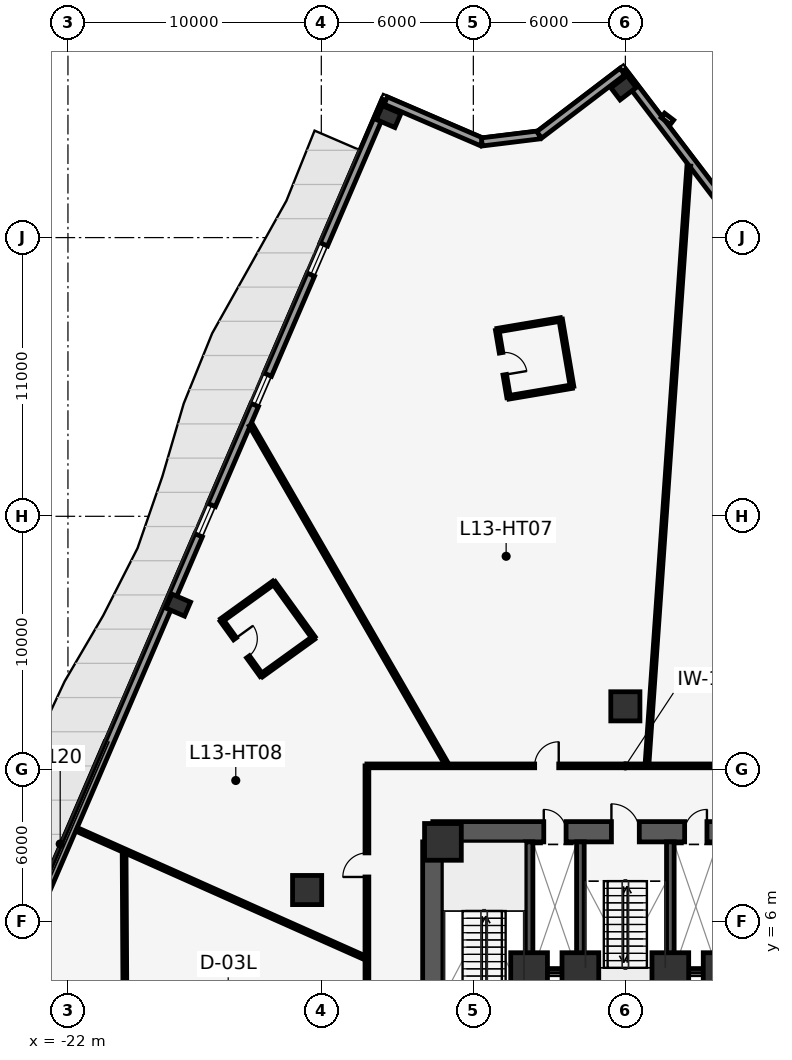
"""IFC4 building model, lengths in metres.
Left out: names, types, materials, properties, quantities, classifications, styles, units other than length and angle.
Written with IfcOpenShell. Run it as: python <this file> out.ifc"""

import sys

from ifc_helpers import new_model, si_unit, direction, frame, frame_2d, origin, origin_2d, place, context, subcontext, project, spatial, rectangle, hollow_rectangle, extrude, element, fill, save


model = new_model("IFC4")
c1 = context("Model", 3, precision=1e-05, world=origin(), true_north=direction((0.0, 1.0)))
c2 = subcontext(c1, "Body", "Model", "MODEL_VIEW")
j1 = project(units=[si_unit("LENGTHUNIT", "METRE"), si_unit("PLANEANGLEUNIT", "RADIAN")], contexts=[c1])
p1 = place(None, origin())
s1 = spatial("IfcSite", under=j1, at=p1, CompositionType="ELEMENT")
p2 = place(p1, origin())
s2 = spatial("IfcBuilding", under=s1, at=p2, CompositionType="ELEMENT")
p3 = place(p2, frame((0.0, 0.0, 62.4)))
s3 = spatial("IfcBuildingStorey", under=s2, at=p3, CompositionType="ELEMENT", Elevation=62.4)
p4 = place(p3, frame((-7.6, 9.55, 0.0), z_axis=(0.0, 0.0, 1.0), x_axis=(1.0, 0.0, 0.0)))
e1 = element("IfcWall", 1, at=p4, inside=s3, PredefinedType="SHEAR", context=c2, shape_type="SweptSolid", body=[
    extrude(rectangle(XDim=15.2, YDim=0.8, at=frame_2d((7.6, 0.0))), origin(), (0.0, 0.0, 1.0), 4.35),
])
p5 = place(p4, frame((7.05, 0.0, 0.0)))
e2 = element("IfcOpeningElement", 2, at=p5, cuts=e1, PredefinedType="OPENING", context=c2, shape_type="SweptSolid", body=[
    extrude(rectangle(XDim=1.1, YDim=2.15, at=frame_2d((0.55, 1.075))), frame((0.0, 0.41, 0.0), z_axis=(0.0, -1.0, 0.0), x_axis=(1.0, 0.0, 0.0)), (0.0, 0.0, 1.0), 0.82),
])
p6 = place(p4, frame((4.38, 0.0, 0.0)))
e3 = element("IfcOpeningElement", 3, at=p6, cuts=e1, PredefinedType="OPENING", context=c2, shape_type="SweptSolid", body=[
    extrude(rectangle(XDim=0.88, YDim=2.15, at=frame_2d((0.44, 1.075))), frame((0.0, 0.41, 0.0), z_axis=(0.0, -1.0, 0.0), x_axis=(1.0, 0.0, 0.0)), (0.0, 0.0, 1.0), 0.82),
])
p7 = place(p4, frame((9.94, 0.0, 0.0)))
e4 = element("IfcOpeningElement", 4, at=p7, cuts=e1, PredefinedType="OPENING", context=c2, shape_type="SweptSolid", body=[
    extrude(rectangle(XDim=0.88, YDim=2.15, at=frame_2d((0.44, 1.075))), frame((0.0, 0.41, 0.0), z_axis=(0.0, -1.0, 0.0), x_axis=(1.0, 0.0, 0.0)), (0.0, 0.0, 1.0), 0.82),
])
for number, where, z_axis, x_axis in (
    (5, (-3.8, 1.45, 0.0), (0.0, 0.0, 1.0), (0.0, 1.0, 0.0)),
    (6, (-1.775, 1.45, 0.0), (0.0, 0.0, 1.0), (0.0, 1.0, 0.0)),
    (7, (1.775, 1.45, 0.0), (0.0, 0.0, 1.0), (0.0, 1.0, 0.0)),
):
    element("IfcWall", number, at=place(p3, frame(where, z_axis=z_axis, x_axis=x_axis)), inside=s3, PredefinedType="SHEAR", context=c2, shape_type="SweptSolid", body=[
        extrude(rectangle(XDim=7.7, YDim=0.3, at=frame_2d((3.85, 0.0))), origin(), (0.0, 0.0, 1.0), 4.35),
    ])
p8 = place(p3, frame((-7.6, 0.1, 0.0), z_axis=(0.0, 0.0, 1.0), x_axis=(0.0, 1.0, 0.0)))
e8 = element("IfcWall", 8, at=p8, inside=s3, PredefinedType="SHEAR", context=c2, shape_type="SweptSolid", body=[
    extrude(rectangle(XDim=9.05, YDim=0.8, at=frame_2d((4.525, 0.0))), origin(), (0.0, 0.0, 1.0), 4.35),
])
for number, where, z_axis, x_axis in (
    (9, (-7.2, 9.15, 0.0), (0.0, 0.0, 1.0), (1.0, 0.0, 0.0)),
    (10, (-3.8, 4.05, 0.0), (0.0, 0.0, 1.0), (1.0, 0.0, 0.0)),
    (11, (3.8, 4.05, 0.0), (0.0, 0.0, 1.0), (1.0, 0.0, 0.0)),
    (12, (-1.775, 4.05, 0.0), (0.0, 0.0, 1.0), (1.0, 0.0, 0.0)),
    (13, (1.775, 4.05, 0.0), (0.0, 0.0, 1.0), (1.0, 0.0, 0.0)),
):
    element("IfcColumn", number, at=place(p3, frame(where, z_axis=z_axis, x_axis=x_axis)), inside=s3, PredefinedType="COLUMN", context=c2, shape_type="SweptSolid", body=[
        extrude(rectangle(XDim=1.45, YDim=1.45, at=origin_2d()), origin(), (0.0, 0.0, 1.0), 4.6),
    ])
for number, where, z_axis, x_axis in (
    (14, (0.0, 14.5, 0.0), (0.0, 0.0, 1.0), (1.0, 0.0, 0.0)),
    (15, (-12.56, 7.25, 0.0), (0.0, 0.0, 1.0), (1.0, 0.0, 0.0)),
):
    element("IfcColumn", number, at=place(p3, frame(where, z_axis=z_axis, x_axis=x_axis)), inside=s3, PredefinedType="COLUMN", context=c2, shape_type="SweptSolid", body=[
        extrude(rectangle(XDim=1.15, YDim=1.15, at=origin_2d()), origin(), (0.0, 0.0, 1.0), 4.6),
    ])
for number, where, z_axis, x_axis in (
    (16, (-9.344, 37.777, 0.0), (0.0, 0.0, 1.0), (0.396, 0.918, 0.0)),
    (17, (-17.648, 18.495, 0.0), (0.0, 0.0, 1.0), (0.396, 0.918, 0.0)),
    (18, (-0.072, 38.915, 0.0), (0.0, 0.0, 1.0), (-0.606, 0.795, 0.0)),
):
    element("IfcColumn", number, at=place(p3, frame(where, z_axis=z_axis, x_axis=x_axis)), inside=s3, PredefinedType="COLUMN", context=c2, shape_type="SweptSolid", body=[
        extrude(hollow_rectangle(XDim=0.6, YDim=0.8, WallThickness=0.05, at=origin_2d()), origin(), (0.0, 0.0, 1.0), 4.6),
    ])
p9 = place(p3, frame((-0.115, 39.555, 0.0), z_axis=(0.0, 0.0, 1.0), x_axis=(0.605877389385, -0.795558036243, 0.0)))
e19 = element("IfcWall", 19, at=p9, inside=s3, PredefinedType="STANDARD", context=c2, shape_type="SweptSolid", body=[
    extrude(rectangle(XDim=64.058, YDim=0.32, at=frame_2d((32.029, 0.0))), origin(), (0.0, 0.0, 1.0), 4.35),
])
p10 = place(p9, frame((6.179, 0.0, 0.85)))
e20 = element("IfcOpeningElement", 20, at=p10, cuts=e19, PredefinedType="OPENING", context=c2, shape_type="SweptSolid", body=[
    extrude(rectangle(XDim=1.3, YDim=2.1, at=frame_2d((0.65, 1.05))), frame((0.0, 0.17, 0.0), z_axis=(0.0, -1.0, 0.0), x_axis=(1.0, 0.0, 0.0)), (0.0, 0.0, 1.0), 0.34),
])
p11 = place(p9, frame((11.779, 0.0, 0.85)))
e21 = element("IfcOpeningElement", 21, at=p11, cuts=e19, PredefinedType="OPENING", context=c2, shape_type="SweptSolid", body=[
    extrude(rectangle(XDim=1.3, YDim=2.1, at=frame_2d((0.65, 1.05))), frame((0.0, 0.17, 0.0), z_axis=(0.0, -1.0, 0.0), x_axis=(1.0, 0.0, 0.0)), (0.0, 0.0, 1.0), 0.34),
])
p12 = place(p9, frame((17.379, 0.0, 0.85)))
e22 = element("IfcOpeningElement", 22, at=p12, cuts=e19, PredefinedType="OPENING", context=c2, shape_type="SweptSolid", body=[
    extrude(rectangle(XDim=1.3, YDim=2.1, at=frame_2d((0.65, 1.05))), frame((0.0, 0.17, 0.0), z_axis=(0.0, -1.0, 0.0), x_axis=(1.0, 0.0, 0.0)), (0.0, 0.0, 1.0), 0.34),
])
p13 = place(p9, frame((50.979, 0.0, 0.85)))
e23 = element("IfcOpeningElement", 23, at=p13, cuts=e19, PredefinedType="OPENING", context=c2, shape_type="SweptSolid", body=[
    extrude(rectangle(XDim=1.3, YDim=2.1, at=frame_2d((0.65, 1.05))), frame((0.0, 0.17, 0.0), z_axis=(0.0, -1.0, 0.0), x_axis=(1.0, 0.0, 0.0)), (0.0, 0.0, 1.0), 0.34),
])
p14 = place(p9, frame((56.579, 0.0, 0.85)))
e24 = element("IfcOpeningElement", 24, at=p14, cuts=e19, PredefinedType="OPENING", context=c2, shape_type="SweptSolid", body=[
    extrude(rectangle(XDim=1.3, YDim=2.1, at=frame_2d((0.65, 1.05))), frame((0.0, 0.17, 0.0), z_axis=(0.0, -1.0, 0.0), x_axis=(1.0, 0.0, 0.0)), (0.0, 0.0, 1.0), 0.34),
])
p15 = place(p3, frame((-34.787, -20.429, 0.0), z_axis=(0.0, 0.0, 1.0), x_axis=(0.395418293843, 0.91850115563, 0.0)))
e25 = element("IfcWall", 25, at=p15, inside=s3, PredefinedType="STANDARD", context=c2, shape_type="SweptSolid", body=[
    extrude(rectangle(XDim=64.058, YDim=0.32, at=frame_2d((32.029, 0.0))), origin(), (0.0, 0.0, 1.0), 4.35),
])
p16 = place(p15, frame((23.542, 0.0, 0.0)))
e26 = element("IfcOpeningElement", 26, at=p16, cuts=e25, PredefinedType="OPENING", context=c2, shape_type="SweptSolid", body=[
    extrude(rectangle(XDim=1.6, YDim=2.2, at=frame_2d((0.8, 1.1))), frame((0.0, 0.17, 0.0), z_axis=(0.0, -1.0, 0.0), x_axis=(1.0, 0.0, 0.0)), (0.0, 0.0, 1.0), 0.34),
])
p17 = place(p15, frame((6.179, 0.0, 0.85)))
e27 = element("IfcOpeningElement", 27, at=p17, cuts=e25, PredefinedType="OPENING", context=c2, shape_type="SweptSolid", body=[
    extrude(rectangle(XDim=1.3, YDim=2.1, at=frame_2d((0.65, 1.05))), frame((0.0, 0.17, 0.0), z_axis=(0.0, -1.0, 0.0), x_axis=(1.0, 0.0, 0.0)), (0.0, 0.0, 1.0), 0.34),
])
p18 = place(p15, frame((17.379, 0.0, 0.85)))
e28 = element("IfcOpeningElement", 28, at=p18, cuts=e25, PredefinedType="OPENING", context=c2, shape_type="SweptSolid", body=[
    extrude(rectangle(XDim=1.3, YDim=2.1, at=frame_2d((0.65, 1.05))), frame((0.0, 0.17, 0.0), z_axis=(0.0, -1.0, 0.0), x_axis=(1.0, 0.0, 0.0)), (0.0, 0.0, 1.0), 0.34),
])
p19 = place(p15, frame((45.379, 0.0, 0.85)))
e29 = element("IfcOpeningElement", 29, at=p19, cuts=e25, PredefinedType="OPENING", context=c2, shape_type="SweptSolid", body=[
    extrude(rectangle(XDim=1.3, YDim=2.1, at=frame_2d((0.65, 1.05))), frame((0.0, 0.17, 0.0), z_axis=(0.0, -1.0, 0.0), x_axis=(1.0, 0.0, 0.0)), (0.0, 0.0, 1.0), 0.34),
])
p20 = place(p15, frame((50.979, 0.0, 0.85)))
e30 = element("IfcOpeningElement", 30, at=p20, cuts=e25, PredefinedType="OPENING", context=c2, shape_type="SweptSolid", body=[
    extrude(rectangle(XDim=1.3, YDim=2.1, at=frame_2d((0.65, 1.05))), frame((0.0, 0.17, 0.0), z_axis=(0.0, -1.0, 0.0), x_axis=(1.0, 0.0, 0.0)), (0.0, 0.0, 1.0), 0.34),
])
p21 = place(p15, frame((56.579, 0.0, 0.85)))
e31 = element("IfcOpeningElement", 31, at=p21, cuts=e25, PredefinedType="OPENING", context=c2, shape_type="SweptSolid", body=[
    extrude(rectangle(XDim=1.3, YDim=2.1, at=frame_2d((0.65, 1.05))), frame((0.0, 0.17, 0.0), z_axis=(0.0, -1.0, 0.0), x_axis=(1.0, 0.0, 0.0)), (0.0, 0.0, 1.0), 0.34),
])
p22 = place(p3, frame((-9.458, 38.408, 0.0), z_axis=(0.0, 0.0, 1.0), x_axis=(0.918510754284, -0.395395996774, 0.0)))
e32 = element("IfcWall", 32, at=p22, inside=s3, PredefinedType="STANDARD", context=c2, shape_type="SweptSolid", body=[
    extrude(rectangle(XDim=4.129, YDim=0.32, at=frame_2d((2.064, 0.0))), origin(), (0.0, 0.0, 1.0), 4.35),
])
p23 = place(p3, frame((-5.665, 36.776, 0.0), z_axis=(0.0, 0.0, 1.0), x_axis=(0.992547088217, 0.121861715369, 0.0)))
e33 = element("IfcWall", 33, at=p23, inside=s3, PredefinedType="STANDARD", context=c2, shape_type="SweptSolid", body=[
    extrude(rectangle(XDim=2.282, YDim=0.32, at=frame_2d((1.141, 0.0))), origin(), (0.0, 0.0, 1.0), 4.35),
])
p24 = place(p3, frame((-3.4, 37.054, 0.0), z_axis=(0.0, 0.0, 1.0), x_axis=(0.795557931523, 0.605877526891, 0.0)))
e34 = element("IfcWall", 34, at=p24, inside=s3, PredefinedType="STANDARD", context=c2, shape_type="SweptSolid", body=[
    extrude(rectangle(XDim=4.129, YDim=0.32, at=frame_2d((2.064, 0.0))), origin(), (0.0, 0.0, 1.0), 4.35),
])
for number, where, z_axis, x_axis in (
    (35, (-3.65, 4.05, 0.0), (0.0, 0.0, 1.0), (1.0, 0.0, 0.0)),
    (36, (1.92, 4.05, 0.0), (0.0, 0.0, 1.0), (1.0, 0.0, 0.0)),
):
    element("IfcWall", number, at=place(p3, frame(where, z_axis=z_axis, x_axis=x_axis)), inside=s3, PredefinedType="PARTITIONING", context=c2, shape_type="SweptSolid", body=[
        extrude(rectangle(XDim=1.73, YDim=0.2, at=frame_2d((0.865, 0.0))), origin(), (0.0, 0.0, 1.0), 4.35),
    ])
p25 = place(p3, frame((-10.2, 12.15, 0.0), z_axis=(0.0, 0.0, 1.0), x_axis=(1.0, 0.0, 0.0)))
e37 = element("IfcWall", 37, at=p25, inside=s3, PredefinedType="PARTITIONING", context=c2, shape_type="SweptSolid", body=[
    extrude(rectangle(XDim=20.4, YDim=0.15, at=frame_2d((10.2, 0.0))), origin(), (0.0, 0.0, 1.0), 4.35),
])
p26 = place(p25, frame((15.125, 0.0, 0.0)))
e38 = element("IfcOpeningElement", 38, at=p26, cuts=e37, PredefinedType="OPENING", context=c2, shape_type="SweptSolid", body=[
    extrude(rectangle(XDim=0.95, YDim=2.15, at=frame_2d((0.475, 1.075))), frame((0.0, 0.085, 0.0), z_axis=(0.0, -1.0, 0.0), x_axis=(1.0, 0.0, 0.0)), (0.0, 0.0, 1.0), 0.17),
])
p27 = place(p25, frame((6.62, 0.0, 0.0)))
e39 = element("IfcOpeningElement", 39, at=p27, cuts=e37, PredefinedType="OPENING", context=c2, shape_type="SweptSolid", body=[
    extrude(rectangle(XDim=0.95, YDim=2.15, at=frame_2d((0.475, 1.075))), frame((0.0, 0.085, 0.0), z_axis=(0.0, -1.0, 0.0), x_axis=(1.0, 0.0, 0.0)), (0.0, 0.0, 1.0), 0.17),
])
p28 = place(p3, frame((-10.2, -11.85, 0.0), z_axis=(0.0, 0.0, 1.0), x_axis=(0.0, 1.0, 0.0)))
e40 = element("IfcWall", 40, at=p28, inside=s3, PredefinedType="PARTITIONING", context=c2, shape_type="SweptSolid", body=[
    extrude(rectangle(XDim=24.0, YDim=0.15, at=frame_2d((12.0, 0.0))), origin(), (0.0, 0.0, 1.0), 4.35),
])
p29 = place(p28, frame((11.995, 0.0, 0.0)))
e41 = element("IfcOpeningElement", 41, at=p29, cuts=e40, PredefinedType="OPENING", context=c2, shape_type="SweptSolid", body=[
    extrude(rectangle(XDim=0.95, YDim=2.15, at=frame_2d((0.475, 1.075))), frame((0.0, 0.085, 0.0), z_axis=(0.0, -1.0, 0.0), x_axis=(1.0, 0.0, 0.0)), (0.0, 0.0, 1.0), 0.17),
])
p30 = place(p28, frame((3.905, 0.0, 0.0)))
e42 = element("IfcOpeningElement", 42, at=p30, cuts=e40, PredefinedType="OPENING", context=c2, shape_type="SweptSolid", body=[
    extrude(rectangle(XDim=0.95, YDim=2.15, at=frame_2d((0.475, 1.075))), frame((0.0, 0.085, 0.0), z_axis=(0.0, -1.0, 0.0), x_axis=(1.0, 0.0, 0.0)), (0.0, 0.0, 1.0), 0.17),
])
p31 = place(p28, frame((19.615, 0.0, 0.0)))
e43 = element("IfcOpeningElement", 43, at=p31, cuts=e40, PredefinedType="OPENING", context=c2, shape_type="SweptSolid", body=[
    extrude(rectangle(XDim=0.95, YDim=2.15, at=frame_2d((0.475, 1.075))), frame((0.0, 0.085, 0.0), z_axis=(0.0, -1.0, 0.0), x_axis=(1.0, 0.0, 0.0)), (0.0, 0.0, 1.0), 0.17),
])
p32 = place(p3, frame((0.857, 12.255, 0.0), z_axis=(0.0, 0.0, 1.0), x_axis=(0.069754890423, 0.997564160975, 0.0)))
e44 = element("IfcWall", 44, at=p32, inside=s3, PredefinedType="PARTITIONING", context=c2, shape_type="SweptSolid", body=[
    extrude(rectangle(XDim=23.628, YDim=0.15, at=frame_2d((11.814, 0.0))), origin(), (0.0, 0.0, 1.0), 4.35),
])
p33 = place(p3, frame((-7.075, 12.255, 0.0), z_axis=(0.0, 0.0, 1.0), x_axis=(-0.499989871069, 0.866031251647, 0.0)))
e45 = element("IfcWall", 45, at=p33, inside=s3, PredefinedType="PARTITIONING", context=c2, shape_type="SweptSolid", body=[
    extrude(rectangle(XDim=15.41, YDim=0.15, at=frame_2d((7.705, 0.0))), origin(), (0.0, 0.0, 1.0), 4.35),
])
p34 = place(p3, frame((-10.305, 4.588, 0.0), z_axis=(0.0, 0.0, 1.0), x_axis=(-0.913551984099, 0.406721984099, 0.0)))
e46 = element("IfcWall", 46, at=p34, inside=s3, PredefinedType="PARTITIONING", context=c2, shape_type="SweptSolid", body=[
    extrude(rectangle(XDim=12.421, YDim=0.15, at=frame_2d((6.21, 0.0))), origin(), (0.0, 0.0, 1.0), 4.35),
])
p35 = place(p3, frame((-19.784, 8.781, 0.0), z_axis=(0.0, 0.0, 1.0), x_axis=(0.005476810205, -0.999985002163, 0.0)))
e47 = element("IfcWall", 47, at=p35, inside=s3, PredefinedType="PARTITIONING", context=c2, shape_type="SweptSolid", body=[
    extrude(rectangle(XDim=15.156, YDim=0.15, at=frame_2d((7.578, 0.0))), origin(), (0.0, 0.0, 1.0), 4.35),
])
p36 = place(p35, frame((7.103, 0.0, 0.0)))
e48 = element("IfcOpeningElement", 48, at=p36, cuts=e47, PredefinedType="OPENING", context=c2, shape_type="SweptSolid", body=[
    extrude(rectangle(XDim=0.95, YDim=2.15, at=frame_2d((0.475, 1.075))), frame((0.0, 0.085, 0.0), z_axis=(0.0, -1.0, 0.0), x_axis=(1.0, 0.0, 0.0)), (0.0, 0.0, 1.0), 0.17),
])
p37 = place(p3, frame((-2.104, 27.118, 0.0), z_axis=(0.0, 0.0, 1.0), x_axis=(-0.166812152126, 0.985988694612, 0.0)))
e49 = element("IfcWall", 49, at=p37, inside=s3, PredefinedType="PARTITIONING", context=c2, shape_type="SweptSolid", body=[
    extrude(rectangle(XDim=2.69, YDim=0.14, at=frame_2d((1.345, 0.0))), origin(), (0.0, 0.0, 1.0), 4.35),
])
p38 = place(p3, frame((-2.552, 29.77, 0.0), z_axis=(0.0, 0.0, 1.0), x_axis=(-0.98599620826, -0.166767734581, 0.0)))
e50 = element("IfcWall", 50, at=p38, inside=s3, PredefinedType="PARTITIONING", context=c2, shape_type="SweptSolid", body=[
    extrude(rectangle(XDim=2.54, YDim=0.14, at=frame_2d((1.27, 0.0))), origin(), (0.0, 0.0, 1.0), 4.35),
])
p39 = place(p3, frame((-5.057, 29.347, 0.0), z_axis=(0.0, 0.0, 1.0), x_axis=(0.166708999579, -0.98600614068, 0.0)))
e51 = element("IfcWall", 51, at=p39, inside=s3, PredefinedType="PARTITIONING", context=c2, shape_type="SweptSolid", body=[
    extrude(rectangle(XDim=2.69, YDim=0.14, at=frame_2d((1.345, 0.0))), origin(), (0.0, 0.0, 1.0), 4.35),
])
p40 = place(p39, frame((0.905, 0.0, 0.0)))
e52 = element("IfcOpeningElement", 52, at=p40, cuts=e51, PredefinedType="OPENING", context=c2, shape_type="SweptSolid", body=[
    extrude(rectangle(XDim=0.88, YDim=2.1, at=frame_2d((0.44, 1.05))), frame((0.0, 0.08, 0.0), z_axis=(0.0, -1.0, 0.0), x_axis=(1.0, 0.0, 0.0)), (0.0, 0.0, 1.0), 0.16),
])
p41 = place(p3, frame((-4.608, 26.694, 0.0), z_axis=(0.0, 0.0, 1.0), x_axis=(0.985983074697, 0.166845366768, 0.0)))
e53 = element("IfcWall", 53, at=p41, inside=s3, PredefinedType="PARTITIONING", context=c2, shape_type="SweptSolid", body=[
    extrude(rectangle(XDim=2.54, YDim=0.14, at=frame_2d((1.27, 0.0))), origin(), (0.0, 0.0, 1.0), 4.35),
])
p42 = place(p3, frame((-12.302, 17.205, 0.0), z_axis=(0.0, 0.0, 1.0), x_axis=(-0.584966842141, 0.811057207351, 0.0)))
e54 = element("IfcWall", 54, at=p42, inside=s3, PredefinedType="PARTITIONING", context=c2, shape_type="SweptSolid", body=[
    extrude(rectangle(XDim=2.69, YDim=0.14, at=frame_2d((1.345, 0.0))), origin(), (0.0, 0.0, 1.0), 4.35),
])
p43 = place(p3, frame((-13.875, 19.387, 0.0), z_axis=(0.0, 0.0, 1.0), x_axis=(-0.811049113512, -0.584978064095, 0.0)))
e55 = element("IfcWall", 55, at=p43, inside=s3, PredefinedType="PARTITIONING", context=c2, shape_type="SweptSolid", body=[
    extrude(rectangle(XDim=2.54, YDim=0.14, at=frame_2d((1.27, 0.0))), origin(), (0.0, 0.0, 1.0), 4.35),
])
p44 = place(p3, frame((-15.936, 17.901, 0.0), z_axis=(0.0, 0.0, 1.0), x_axis=(0.584966842141, -0.811057207351, 0.0)))
e56 = element("IfcWall", 56, at=p44, inside=s3, PredefinedType="PARTITIONING", context=c2, shape_type="SweptSolid", body=[
    extrude(rectangle(XDim=2.69, YDim=0.14, at=frame_2d((1.345, 0.0))), origin(), (0.0, 0.0, 1.0), 4.35),
])
p45 = place(p44, frame((0.905, 0.0, 0.0)))
e57 = element("IfcOpeningElement", 57, at=p45, cuts=e56, PredefinedType="OPENING", context=c2, shape_type="SweptSolid", body=[
    extrude(rectangle(XDim=0.88, YDim=2.1, at=frame_2d((0.44, 1.05))), frame((0.0, 0.08, 0.0), z_axis=(0.0, -1.0, 0.0), x_axis=(1.0, 0.0, 0.0)), (0.0, 0.0, 1.0), 0.16),
])
p46 = place(p3, frame((-14.362, 15.719, 0.0), z_axis=(0.0, 0.0, 1.0), x_axis=(0.811049113512, 0.584978064095, 0.0)))
e58 = element("IfcWall", 58, at=p46, inside=s3, PredefinedType="PARTITIONING", context=c2, shape_type="SweptSolid", body=[
    extrude(rectangle(XDim=2.54, YDim=0.14, at=frame_2d((1.27, 0.0))), origin(), (0.0, 0.0, 1.0), 4.35),
])
p47 = place(p19, origin())
e59 = element("IfcWindow", 59, at=p47, inside=s3, PartitioningType="SINGLE_PANEL", PredefinedType="WINDOW", context=c2, shape_type="SweptSolid", body=[
    extrude(rectangle(XDim=1.3, YDim=2.1, at=frame_2d((0.65, 1.05))), frame((0.0, 0.03, 0.0), z_axis=(0.0, -1.0, 0.0), x_axis=(1.0, 0.0, 0.0)), (0.0, 0.0, 1.0), 0.06),
])
fill(e29, e59)
p48 = place(p20, origin())
e60 = element("IfcWindow", 60, at=p48, inside=s3, PartitioningType="SINGLE_PANEL", PredefinedType="WINDOW", context=c2, shape_type="SweptSolid", body=[
    extrude(rectangle(XDim=1.3, YDim=2.1, at=frame_2d((0.65, 1.05))), frame((0.0, 0.03, 0.0), z_axis=(0.0, -1.0, 0.0), x_axis=(1.0, 0.0, 0.0)), (0.0, 0.0, 1.0), 0.06),
])
fill(e30, e60)
p49 = place(p21, origin())
e61 = element("IfcWindow", 61, at=p49, inside=s3, PartitioningType="SINGLE_PANEL", PredefinedType="WINDOW", context=c2, shape_type="SweptSolid", body=[
    extrude(rectangle(XDim=1.3, YDim=2.1, at=frame_2d((0.65, 1.05))), frame((0.0, 0.03, 0.0), z_axis=(0.0, -1.0, 0.0), x_axis=(1.0, 0.0, 0.0)), (0.0, 0.0, 1.0), 0.06),
])
fill(e31, e61)
p50 = place(p5, origin())
e62 = element("IfcDoor", 62, at=p50, inside=s3, OperationType="SINGLE_SWING_LEFT", PredefinedType="DOOR", context=c2, shape_type="SweptSolid", body=[
    extrude(rectangle(XDim=1.1, YDim=2.15, at=frame_2d((0.55, 1.075))), frame((0.0, 0.025, 0.0), z_axis=(0.0, -1.0, 0.0), x_axis=(1.0, 0.0, 0.0)), (0.0, 0.0, 1.0), 0.05),
])
fill(e2, e62)
p51 = place(p6, origin())
e63 = element("IfcDoor", 63, at=p51, inside=s3, OperationType="SINGLE_SWING_LEFT", PredefinedType="DOOR", context=c2, shape_type="SweptSolid", body=[
    extrude(rectangle(XDim=0.88, YDim=2.15, at=frame_2d((0.44, 1.075))), frame((0.0, 0.025, 0.0), z_axis=(0.0, -1.0, 0.0), x_axis=(1.0, 0.0, 0.0)), (0.0, 0.0, 1.0), 0.05),
])
fill(e3, e63)
p52 = place(p7, origin())
e64 = element("IfcDoor", 64, at=p52, inside=s3, OperationType="SINGLE_SWING_RIGHT", PredefinedType="DOOR", context=c2, shape_type="SweptSolid", body=[
    extrude(rectangle(XDim=0.88, YDim=2.15, at=frame_2d((0.44, 1.075))), frame((0.0, 0.025, 0.0), z_axis=(0.0, -1.0, 0.0), x_axis=(1.0, 0.0, 0.0)), (0.0, 0.0, 1.0), 0.05),
])
fill(e4, e64)
p53 = place(p40, origin())
e65 = element("IfcDoor", 65, at=p53, inside=s3, OperationType="SINGLE_SWING_RIGHT", PredefinedType="DOOR", context=c2, shape_type="SweptSolid", body=[
    extrude(rectangle(XDim=0.88, YDim=2.1, at=frame_2d((0.44, 1.05))), frame((0.0, 0.025, 0.0), z_axis=(0.0, -1.0, 0.0), x_axis=(1.0, 0.0, 0.0)), (0.0, 0.0, 1.0), 0.05),
])
fill(e52, e65)
p54 = place(p45, origin())
e66 = element("IfcDoor", 66, at=p54, inside=s3, OperationType="SINGLE_SWING_LEFT", PredefinedType="DOOR", context=c2, shape_type="SweptSolid", body=[
    extrude(rectangle(XDim=0.88, YDim=2.1, at=frame_2d((0.44, 1.05))), frame((0.0, 0.025, 0.0), z_axis=(0.0, -1.0, 0.0), x_axis=(1.0, 0.0, 0.0)), (0.0, 0.0, 1.0), 0.05),
])
fill(e57, e66)
p55 = place(p27, origin())
e67 = element("IfcDoor", 67, at=p55, inside=s3, OperationType="SINGLE_SWING_RIGHT", PredefinedType="DOOR", context=c2, shape_type="SweptSolid", body=[
    extrude(rectangle(XDim=0.95, YDim=2.15, at=frame_2d((0.475, 1.075))), frame((0.0, 0.025, 0.0), z_axis=(0.0, -1.0, 0.0), x_axis=(1.0, 0.0, 0.0)), (0.0, 0.0, 1.0), 0.05),
])
fill(e39, e67)
p56 = place(p31, origin())
e68 = element("IfcDoor", 68, at=p56, inside=s3, OperationType="SINGLE_SWING_LEFT", PredefinedType="DOOR", context=c2, shape_type="SweptSolid", body=[
    extrude(rectangle(XDim=0.95, YDim=2.15, at=frame_2d((0.475, 1.075))), frame((0.0, 0.025, 0.0), z_axis=(0.0, -1.0, 0.0), x_axis=(1.0, 0.0, 0.0)), (0.0, 0.0, 1.0), 0.05),
])
fill(e43, e68)
save(model, sys.argv[1])
